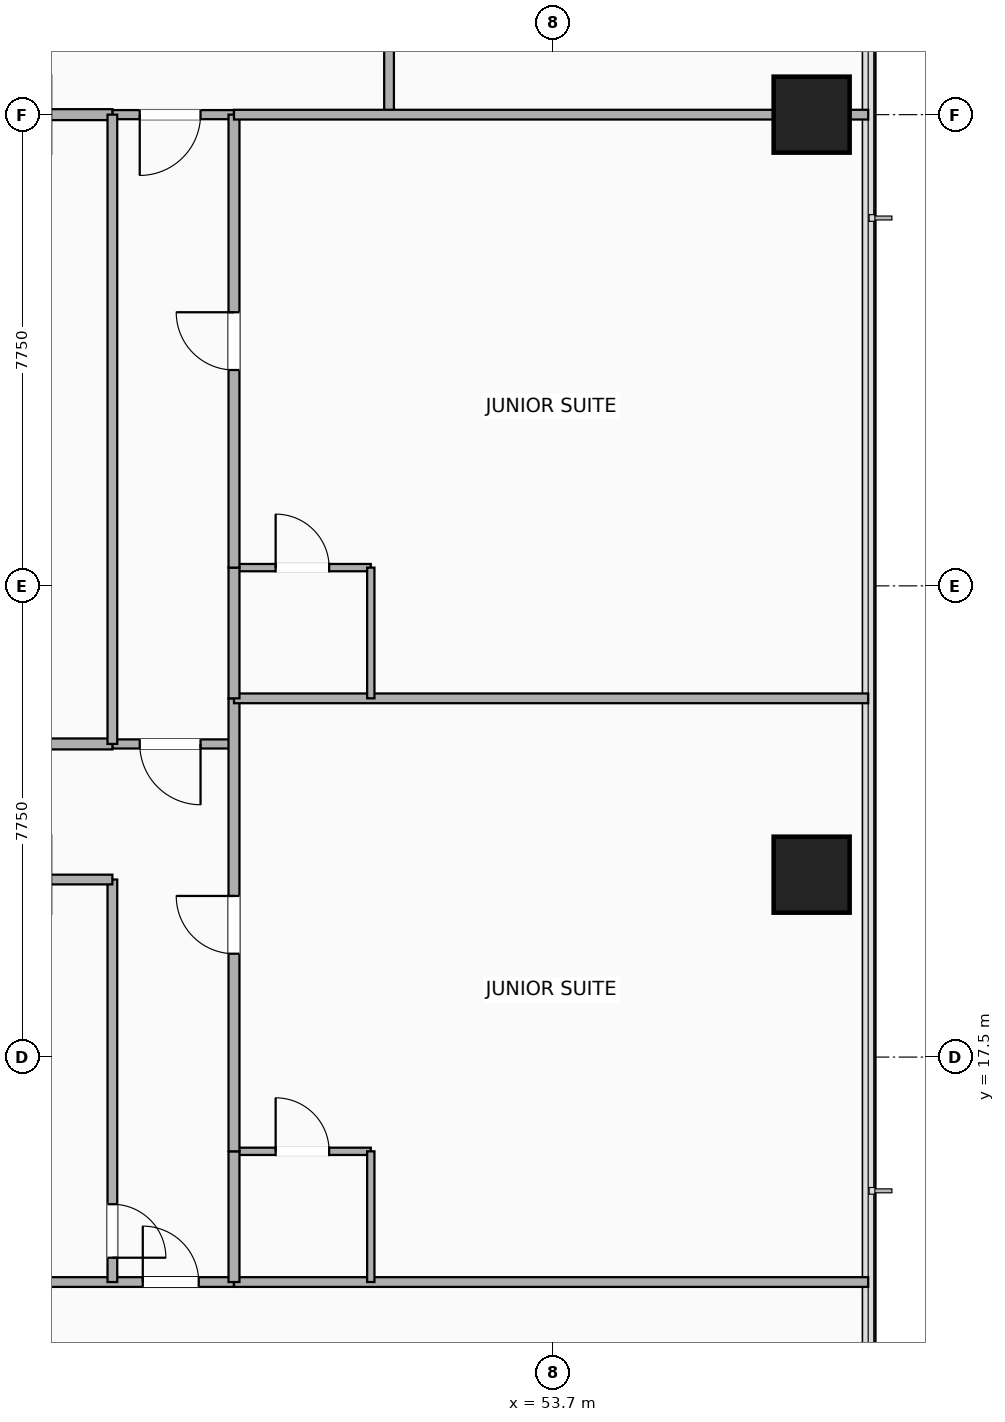
"""IFC4 building model, lengths in metres.
Left out: names, types, materials, properties, quantities, classifications, styles, units other than length and angle.
Written with IfcOpenShell. Run it as: python <this file> out.ifc"""

import sys

from ifc_helpers import new_model, si_unit, direction, frame, frame_2d, origin, origin_2d, place, context, subcontext, project, spatial, rectangle, extrude, element, fill, save


model = new_model("IFC4")
c1 = context("Model", 3, precision=1e-05, world=origin(), true_north=direction((0.0, 1.0)))
c2 = subcontext(c1, "Body", "Model", "MODEL_VIEW")
j1 = project(units=[si_unit("LENGTHUNIT", "METRE"), si_unit("PLANEANGLEUNIT", "RADIAN")], contexts=[c1])
p1 = place(None, origin())
s1 = spatial("IfcSite", under=j1, at=p1, CompositionType="ELEMENT")
p2 = place(p1, origin())
s2 = spatial("IfcBuilding", under=s1, at=p2, CompositionType="ELEMENT")
p3 = place(p2, frame((0.0, 0.0, 95.2)))
s3 = spatial("IfcBuildingStorey", under=s2, at=p3, CompositionType="ELEMENT", Elevation=95.2)
for number, where, z_axis, x_axis in (
    (1, (57.95, 20.5, -0.26), (0.0, 0.0, 1.0), (1.0, 0.0, 0.0)),
    (2, (57.95, 33.0, -0.26), (0.0, 0.0, 1.0), (1.0, 0.0, 0.0)),
):
    element("IfcColumn", number, at=place(p3, frame(where, z_axis=z_axis, x_axis=x_axis)), inside=s3, PredefinedType="COLUMN", context=c2, shape_type="SweptSolid", body=[
        extrude(rectangle(XDim=1.25, YDim=1.25, at=origin_2d()), origin(), (0.0, 0.0, 1.0), 3.5),
    ])
p4 = place(p3, frame((44.8, 13.8, 0.0), z_axis=(0.0, 0.0, 1.0), x_axis=(1.0, 0.0, 0.0)))
e3 = element("IfcWall", 3, at=p4, inside=s3, PredefinedType="PARTITIONING", context=c2, shape_type="SweptSolid", body=[
    extrude(rectangle(XDim=3.65, YDim=0.16, at=frame_2d((1.825, 0.0))), origin(), (0.0, 0.0, 1.0), 2.313),
])
p5 = place(p4, frame((3.07, 0.0, 0.0), z_axis=(0.0, 0.0, 1.0), x_axis=(-1.0, 0.0, 0.0)))
e4 = element("IfcOpeningElement", 4, at=p5, cuts=e3, PredefinedType="OPENING", context=c2, shape_type="SweptSolid", body=[
    extrude(rectangle(XDim=0.92, YDim=2.08, at=frame_2d((0.46, 1.04))), frame((0.0, 0.09, 0.0), z_axis=(0.0, -1.0, 0.0), x_axis=(1.0, 0.0, 0.0)), (0.0, 0.0, 1.0), 0.18),
])
p6 = place(p3, frame((46.45, 13.8, 0.0), z_axis=(0.0, 0.0, 1.0), x_axis=(0.0, 1.0, 0.0)))
e5 = element("IfcWall", 5, at=p6, inside=s3, PredefinedType="PARTITIONING", context=c2, shape_type="SweptSolid", body=[
    extrude(rectangle(XDim=6.62, YDim=0.16, at=frame_2d((3.31, 0.0))), origin(), (0.0, 0.0, 1.0), 2.313),
])
p7 = place(p6, frame((0.4, 0.0, 0.0)))
e6 = element("IfcOpeningElement", 6, at=p7, cuts=e5, PredefinedType="OPENING", context=c2, shape_type="SweptSolid", body=[
    extrude(rectangle(XDim=0.88, YDim=2.08, at=frame_2d((0.44, 1.04))), frame((0.0, 0.09, 0.0), z_axis=(0.0, -1.0, 0.0), x_axis=(1.0, 0.0, 0.0)), (0.0, 0.0, 1.0), 0.18),
])
p8 = place(p3, frame((44.8, 20.42, 0.0), z_axis=(0.0, 0.0, 1.0), x_axis=(1.0, 0.0, 0.0)))
e7 = element("IfcWall", 7, at=p8, inside=s3, PredefinedType="PARTITIONING", context=c2, shape_type="SweptSolid", body=[
    extrude(rectangle(XDim=1.65, YDim=0.16, at=frame_2d((0.825, 0.0))), origin(), (0.0, 0.0, 1.0), 2.313),
])
p9 = place(p3, frame((46.45, 22.65, 0.0), z_axis=(0.0, 0.0, 1.0), x_axis=(1.0, 0.0, 0.0)))
e8 = element("IfcWall", 8, at=p9, inside=s3, PredefinedType="PARTITIONING", context=c2, shape_type="SweptSolid", body=[
    extrude(rectangle(XDim=2.0, YDim=0.15, at=frame_2d((1.0, 0.0))), origin(), (0.0, 0.0, 1.0), 3.24),
])
p10 = place(p9, frame((0.45, 0.0, 0.0)))
e9 = element("IfcOpeningElement", 9, at=p10, cuts=e8, PredefinedType="OPENING", context=c2, shape_type="SweptSolid", body=[
    extrude(rectangle(XDim=1.0, YDim=2.15, at=frame_2d((0.5, 1.075))), frame((0.0, 0.085, 0.0), z_axis=(0.0, -1.0, 0.0), x_axis=(1.0, 0.0, 0.0)), (0.0, 0.0, 1.0), 0.17),
])
p11 = place(p3, frame((46.45, 33.0, 0.0), z_axis=(0.0, 0.0, 1.0), x_axis=(1.0, 0.0, 0.0)))
e10 = element("IfcWall", 10, at=p11, inside=s3, PredefinedType="PARTITIONING", context=c2, shape_type="SweptSolid", body=[
    extrude(rectangle(XDim=2.0, YDim=0.15, at=frame_2d((1.0, 0.0))), origin(), (0.0, 0.0, 1.0), 2.313),
])
p12 = place(p11, frame((0.45, 0.0, 0.0)))
e11 = element("IfcOpeningElement", 11, at=p12, cuts=e10, PredefinedType="OPENING", context=c2, shape_type="SweptSolid", body=[
    extrude(rectangle(XDim=1.0, YDim=2.15, at=frame_2d((0.5, 1.075))), frame((0.0, 0.085, 0.0), z_axis=(0.0, -1.0, 0.0), x_axis=(1.0, 0.0, 0.0)), (0.0, 0.0, 1.0), 0.17),
])
p13 = place(p3, frame((51.0, 33.0, 0.0), z_axis=(0.0, 0.0, 1.0), x_axis=(0.0, 1.0, 0.0)))
e12 = element("IfcWall", 12, at=p13, inside=s3, PredefinedType="PARTITIONING", context=c2, shape_type="SweptSolid", body=[
    extrude(rectangle(XDim=2.05, YDim=0.16, at=frame_2d((1.025, 0.0))), origin(), (0.0, 0.0, 1.0), 2.313),
])
p14 = place(p3, frame((39.1, 22.65, 0.0), z_axis=(0.0, 0.0, 1.0), x_axis=(1.0, 0.0, 0.0)))
e13 = element("IfcWall", 13, at=p14, inside=s3, PredefinedType="PARTITIONING", context=c2, shape_type="SweptSolid", body=[
    extrude(rectangle(XDim=7.35, YDim=0.18, at=frame_2d((3.675, 0.0))), origin(), (0.0, 0.0, 1.0), 2.313),
])
p15 = place(p14, frame((3.2, 0.0, 0.0)))
e14 = element("IfcOpeningElement", 14, at=p15, cuts=e13, PredefinedType="OPENING", context=c2, shape_type="SweptSolid", body=[
    extrude(rectangle(XDim=0.95, YDim=2.15, at=frame_2d((0.475, 1.075))), frame((0.0, 0.1, 0.0), z_axis=(0.0, -1.0, 0.0), x_axis=(1.0, 0.0, 0.0)), (0.0, 0.0, 1.0), 0.2),
])
p16 = place(p3, frame((39.1, 33.0, 0.0), z_axis=(0.0, 0.0, 1.0), x_axis=(1.0, 0.0, 0.0)))
e15 = element("IfcWall", 15, at=p16, inside=s3, PredefinedType="PARTITIONING", context=c2, shape_type="SweptSolid", body=[
    extrude(rectangle(XDim=7.35, YDim=0.18, at=frame_2d((3.675, 0.0))), origin(), (0.0, 0.0, 1.0), 2.313),
])
p17 = place(p3, frame((46.45, 22.65, 0.0), z_axis=(0.0, 0.0, 1.0), x_axis=(0.0, 1.0, 0.0)))
e16 = element("IfcWall", 16, at=p17, inside=s3, PredefinedType="PARTITIONING", context=c2, shape_type="SweptSolid", body=[
    extrude(rectangle(XDim=10.35, YDim=0.16, at=frame_2d((5.175, 0.0))), origin(), (0.0, 0.0, 1.0), 2.313),
])
p18 = place(p3, frame((48.45, 13.8, 0.0), z_axis=(0.0, 0.0, 1.0), x_axis=(1.0, 0.0, 0.0)))
e17 = element("IfcWall", 17, at=p18, inside=s3, PredefinedType="PARTITIONING", context=c2, shape_type="SweptSolid", body=[
    extrude(rectangle(XDim=10.43, YDim=0.16, at=frame_2d((5.215, 0.0))), origin(), (0.0, 0.0, 1.0), 2.603),
])
p19 = place(p3, frame((48.45, 15.95, 0.0), z_axis=(0.0, 0.0, 1.0), x_axis=(1.0, 0.0, 0.0)))
e18 = element("IfcWall", 18, at=p19, inside=s3, PredefinedType="PARTITIONING", context=c2, shape_type="SweptSolid", body=[
    extrude(rectangle(XDim=2.25, YDim=0.12, at=frame_2d((1.125, 0.0))), origin(), (0.0, 0.0, 1.0), 3.24),
])
p20 = place(p19, frame((1.565, 0.0, 0.0), z_axis=(0.0, 0.0, 1.0), x_axis=(-1.0, 0.0, 0.0)))
e19 = element("IfcOpeningElement", 19, at=p20, cuts=e18, PredefinedType="OPENING", context=c2, shape_type="SweptSolid", body=[
    extrude(rectangle(XDim=0.88, YDim=2.08, at=frame_2d((0.44, 1.04))), frame((0.0, 0.07, 0.0), z_axis=(0.0, -1.0, 0.0), x_axis=(1.0, 0.0, 0.0)), (0.0, 0.0, 1.0), 0.14),
])
p21 = place(p3, frame((50.7, 13.8, 0.0), z_axis=(0.0, 0.0, 1.0), x_axis=(0.0, 1.0, 0.0)))
e20 = element("IfcWall", 20, at=p21, inside=s3, PredefinedType="PARTITIONING", context=c2, shape_type="SweptSolid", body=[
    extrude(rectangle(XDim=2.15, YDim=0.12, at=frame_2d((1.075, 0.0))), origin(), (0.0, 0.0, 1.0), 2.922),
])
p22 = place(p3, frame((48.45, 13.8, 0.0), z_axis=(0.0, 0.0, 1.0), x_axis=(0.0, 1.0, 0.0)))
e21 = element("IfcWall", 21, at=p22, inside=s3, PredefinedType="PARTITIONING", context=c2, shape_type="SweptSolid", body=[
    extrude(rectangle(XDim=2.15, YDim=0.18, at=frame_2d((1.075, 0.0))), origin(), (0.0, 0.0, 1.0), 2.922),
])
p23 = place(p3, frame((48.45, 15.95, 0.0), z_axis=(0.0, 0.0, 1.0), x_axis=(0.0, 1.0, 0.0)))
e22 = element("IfcWall", 22, at=p23, inside=s3, PredefinedType="PARTITIONING", context=c2, shape_type="SweptSolid", body=[
    extrude(rectangle(XDim=7.45, YDim=0.18, at=frame_2d((3.725, 0.0))), origin(), (0.0, 0.0, 1.0), 2.313),
])
p24 = place(p23, frame((4.2, 0.0, 0.0), z_axis=(0.0, 0.0, 1.0), x_axis=(-1.0, 0.0, 0.0)))
e23 = element("IfcOpeningElement", 23, at=p24, cuts=e22, PredefinedType="OPENING", context=c2, shape_type="SweptSolid", body=[
    extrude(rectangle(XDim=0.95, YDim=2.15, at=frame_2d((0.475, 1.075))), frame((0.0, 0.1, 0.0), z_axis=(0.0, -1.0, 0.0), x_axis=(1.0, 0.0, 0.0)), (0.0, 0.0, 1.0), 0.2),
])
p25 = place(p3, frame((48.45, 23.4, 0.0), z_axis=(0.0, 0.0, 1.0), x_axis=(1.0, 0.0, 0.0)))
e24 = element("IfcWall", 24, at=p25, inside=s3, PredefinedType="PARTITIONING", context=c2, shape_type="SweptSolid", body=[
    extrude(rectangle(XDim=10.43, YDim=0.16, at=frame_2d((5.215, 0.0))), origin(), (0.0, 0.0, 1.0), 2.603),
])
p26 = place(p3, frame((48.45, 25.55, 0.0), z_axis=(0.0, 0.0, 1.0), x_axis=(1.0, 0.0, 0.0)))
e25 = element("IfcWall", 25, at=p26, inside=s3, PredefinedType="PARTITIONING", context=c2, shape_type="SweptSolid", body=[
    extrude(rectangle(XDim=2.25, YDim=0.12, at=frame_2d((1.125, 0.0))), origin(), (0.0, 0.0, 1.0), 3.24),
])
p27 = place(p26, frame((1.565, 0.0, 0.0), z_axis=(0.0, 0.0, 1.0), x_axis=(-1.0, 0.0, 0.0)))
e26 = element("IfcOpeningElement", 26, at=p27, cuts=e25, PredefinedType="OPENING", context=c2, shape_type="SweptSolid", body=[
    extrude(rectangle(XDim=0.88, YDim=2.08, at=frame_2d((0.44, 1.04))), frame((0.0, 0.07, 0.0), z_axis=(0.0, -1.0, 0.0), x_axis=(1.0, 0.0, 0.0)), (0.0, 0.0, 1.0), 0.14),
])
p28 = place(p3, frame((50.7, 23.4, 0.0), z_axis=(0.0, 0.0, 1.0), x_axis=(0.0, 1.0, 0.0)))
e27 = element("IfcWall", 27, at=p28, inside=s3, PredefinedType="PARTITIONING", context=c2, shape_type="SweptSolid", body=[
    extrude(rectangle(XDim=2.15, YDim=0.12, at=frame_2d((1.075, 0.0))), origin(), (0.0, 0.0, 1.0), 2.818),
])
p29 = place(p3, frame((48.45, 23.4, 0.0), z_axis=(0.0, 0.0, 1.0), x_axis=(0.0, 1.0, 0.0)))
e28 = element("IfcWall", 28, at=p29, inside=s3, PredefinedType="PARTITIONING", context=c2, shape_type="SweptSolid", body=[
    extrude(rectangle(XDim=2.15, YDim=0.18, at=frame_2d((1.075, 0.0))), origin(), (0.0, 0.0, 1.0), 2.818),
])
p30 = place(p3, frame((48.45, 25.55, 0.0), z_axis=(0.0, 0.0, 1.0), x_axis=(0.0, 1.0, 0.0)))
e29 = element("IfcWall", 29, at=p30, inside=s3, PredefinedType="PARTITIONING", context=c2, shape_type="SweptSolid", body=[
    extrude(rectangle(XDim=7.45, YDim=0.18, at=frame_2d((3.725, 0.0))), origin(), (0.0, 0.0, 1.0), 2.313),
])
p31 = place(p30, frame((4.2, 0.0, 0.0), z_axis=(0.0, 0.0, 1.0), x_axis=(-1.0, 0.0, 0.0)))
e30 = element("IfcOpeningElement", 30, at=p31, cuts=e29, PredefinedType="OPENING", context=c2, shape_type="SweptSolid", body=[
    extrude(rectangle(XDim=0.95, YDim=2.15, at=frame_2d((0.475, 1.075))), frame((0.0, 0.1, 0.0), z_axis=(0.0, -1.0, 0.0), x_axis=(1.0, 0.0, 0.0)), (0.0, 0.0, 1.0), 0.2),
])
p32 = place(p3, frame((48.45, 33.0, 0.0), z_axis=(0.0, 0.0, 1.0), x_axis=(1.0, 0.0, 0.0)))
e31 = element("IfcWall", 31, at=p32, inside=s3, PredefinedType="PARTITIONING", context=c2, shape_type="SweptSolid", body=[
    extrude(rectangle(XDim=10.43, YDim=0.16, at=frame_2d((5.215, 0.0))), origin(), (0.0, 0.0, 1.0), 2.313),
])
p33 = place(p5, origin())
e32 = element("IfcDoor", 32, at=p33, inside=s3, OperationType="SINGLE_SWING_LEFT", PredefinedType="DOOR", context=c2, shape_type="SweptSolid", body=[
    extrude(rectangle(XDim=0.92, YDim=2.08, at=frame_2d((0.46, 1.04))), frame((0.0, 0.025, 0.0), z_axis=(0.0, -1.0, 0.0), x_axis=(1.0, 0.0, 0.0)), (0.0, 0.0, 1.0), 0.05),
])
fill(e4, e32)
p34 = place(p7, origin())
e33 = element("IfcDoor", 33, at=p34, inside=s3, OperationType="SINGLE_SWING_LEFT", PredefinedType="DOOR", context=c2, shape_type="SweptSolid", body=[
    extrude(rectangle(XDim=0.88, YDim=2.08, at=frame_2d((0.44, 1.04))), frame((0.0, 0.025, 0.0), z_axis=(0.0, -1.0, 0.0), x_axis=(1.0, 0.0, 0.0)), (0.0, 0.0, 1.0), 0.05),
])
fill(e6, e33)
p35 = place(p10, origin())
e34 = element("IfcDoor", 34, at=p35, inside=s3, OperationType="SINGLE_SWING_RIGHT", PredefinedType="DOOR", context=c2, shape_type="SweptSolid", body=[
    extrude(rectangle(XDim=1.0, YDim=2.15, at=frame_2d((0.5, 1.075))), frame((0.0, 0.025, 0.0), z_axis=(0.0, -1.0, 0.0), x_axis=(1.0, 0.0, 0.0)), (0.0, 0.0, 1.0), 0.05),
])
fill(e9, e34)
p36 = place(p12, origin())
e35 = element("IfcDoor", 35, at=p36, inside=s3, OperationType="SINGLE_SWING_LEFT", PredefinedType="DOOR", context=c2, shape_type="SweptSolid", body=[
    extrude(rectangle(XDim=1.0, YDim=2.15, at=frame_2d((0.5, 1.075))), frame((0.0, 0.025, 0.0), z_axis=(0.0, -1.0, 0.0), x_axis=(1.0, 0.0, 0.0)), (0.0, 0.0, 1.0), 0.05),
])
fill(e11, e35)
p37 = place(p20, origin())
e36 = element("IfcDoor", 36, at=p37, inside=s3, OperationType="SINGLE_SWING_LEFT", PredefinedType="DOOR", context=c2, shape_type="SweptSolid", body=[
    extrude(rectangle(XDim=0.88, YDim=2.08, at=frame_2d((0.44, 1.04))), frame((0.0, 0.025, 0.0), z_axis=(0.0, -1.0, 0.0), x_axis=(1.0, 0.0, 0.0)), (0.0, 0.0, 1.0), 0.05),
])
fill(e19, e36)
p38 = place(p24, origin())
e37 = element("IfcDoor", 37, at=p38, inside=s3, OperationType="SINGLE_SWING_RIGHT", PredefinedType="DOOR", context=c2, shape_type="SweptSolid", body=[
    extrude(rectangle(XDim=0.95, YDim=2.15, at=frame_2d((0.475, 1.075))), frame((0.0, 0.025, 0.0), z_axis=(0.0, -1.0, 0.0), x_axis=(1.0, 0.0, 0.0)), (0.0, 0.0, 1.0), 0.05),
])
fill(e23, e37)
p39 = place(p27, origin())
e38 = element("IfcDoor", 38, at=p39, inside=s3, OperationType="SINGLE_SWING_LEFT", PredefinedType="DOOR", context=c2, shape_type="SweptSolid", body=[
    extrude(rectangle(XDim=0.88, YDim=2.08, at=frame_2d((0.44, 1.04))), frame((0.0, 0.025, 0.0), z_axis=(0.0, -1.0, 0.0), x_axis=(1.0, 0.0, 0.0)), (0.0, 0.0, 1.0), 0.05),
])
fill(e26, e38)
p40 = place(p31, origin())
e39 = element("IfcDoor", 39, at=p40, inside=s3, OperationType="SINGLE_SWING_RIGHT", PredefinedType="DOOR", context=c2, shape_type="SweptSolid", body=[
    extrude(rectangle(XDim=0.95, YDim=2.15, at=frame_2d((0.475, 1.075))), frame((0.0, 0.025, 0.0), z_axis=(0.0, -1.0, 0.0), x_axis=(1.0, 0.0, 0.0)), (0.0, 0.0, 1.0), 0.05),
])
fill(e30, e39)
save(model, sys.argv[1])
